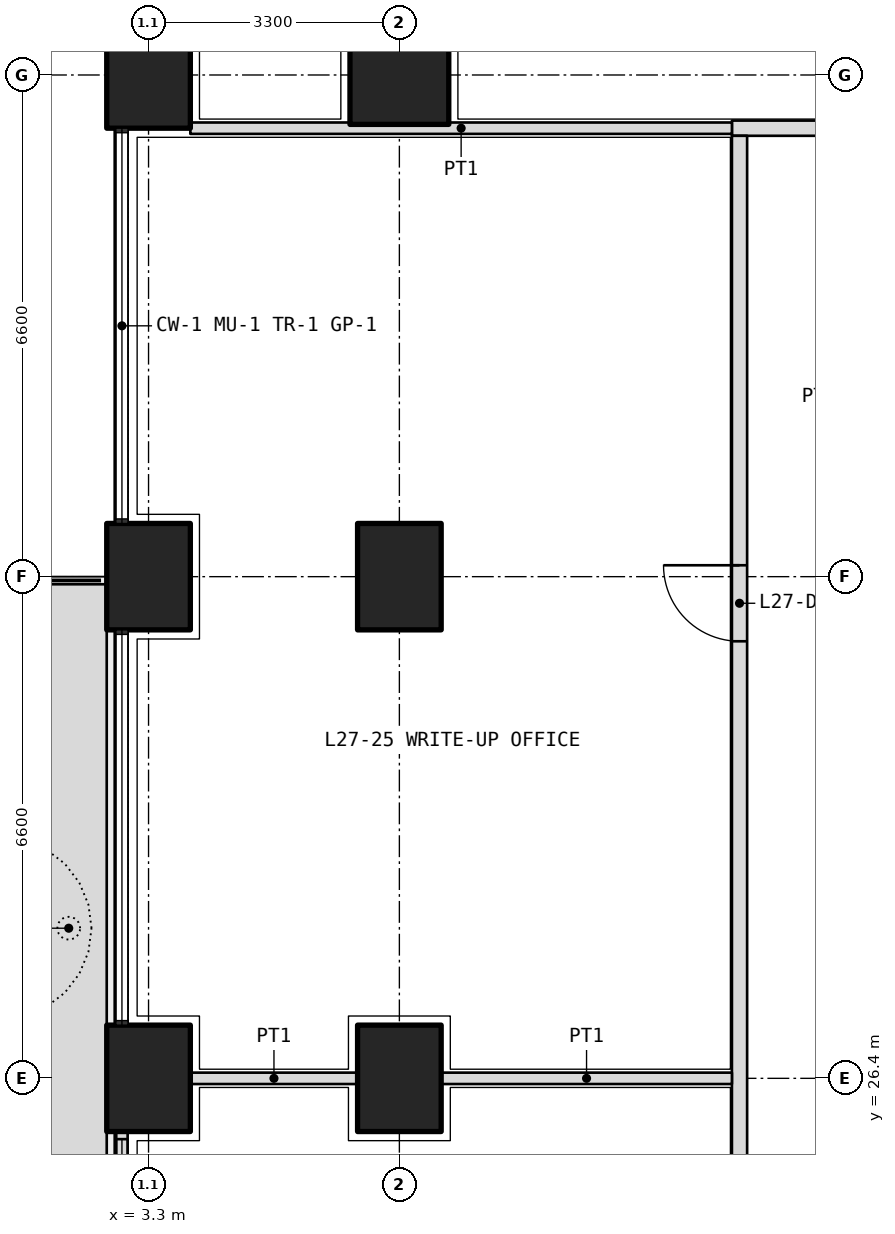
"""IFC4 building model, lengths in metres.
Left out: names, types, materials, properties, quantities, classifications, styles, units other than length and angle.
Written with IfcOpenShell. Run it as: python <this file> out.ifc"""

import sys

from ifc_helpers import new_model, si_unit, direction, frame, frame_2d, origin, origin_2d, place, context, subcontext, project, spatial, polyline, rectangle, outline, extrude, element, fill, save


model = new_model("IFC4")
c1 = context("Model", 3, precision=1e-05, world=origin(), true_north=direction((0.0, 1.0)))
c2 = subcontext(c1, "Body", "Model", "MODEL_VIEW")
j1 = project(units=[si_unit("LENGTHUNIT", "METRE"), si_unit("PLANEANGLEUNIT", "RADIAN")], contexts=[c1])
p1 = place(None, origin())
s1 = spatial("IfcSite", under=j1, at=p1, CompositionType="ELEMENT")
p2 = place(p1, origin())
s2 = spatial("IfcBuilding", under=s1, at=p2, CompositionType="ELEMENT")
p3 = place(p2, frame((0.0, 0.0, 120.0)))
s3 = spatial("IfcBuildingStorey", under=s2, at=p3, CompositionType="ELEMENT", Elevation=120.0)
for number, where, z_axis, x_axis in (
    (1, (3.3, 26.4, 0.0), (0.0, 0.0, 1.0), (0.0, 1.0, 0.0)),
    (2, (3.3, 33.0, 0.0), (0.0, 0.0, 1.0), (0.0, 1.0, 0.0)),
    (3, (3.3, 39.6, 0.0), (0.0, 0.0, 1.0), (0.0, 1.0, 0.0)),
):
    element("IfcColumn", number, at=place(p3, frame(where, z_axis=z_axis, x_axis=x_axis)), inside=s3, PredefinedType="COLUMN", context=c2, shape_type="SweptSolid", body=[
        extrude(rectangle(XDim=1.4, YDim=1.1, at=origin_2d()), origin(), (0.0, 0.0, 1.0), 4.2),
    ])
p4 = place(p3, frame((6.6, 39.6, 0.0), z_axis=(0.0, 0.0, 1.0), x_axis=(1.0, 0.0, 0.0)))
e4 = element("IfcColumn", 4, at=p4, inside=s3, PredefinedType="COLUMN", context=c2, shape_type="SweptSolid", body=[
    extrude(rectangle(XDim=1.3, YDim=1.3, at=origin_2d()), origin(), (0.0, 0.0, 1.0), 4.2),
])
for number, where, z_axis, x_axis in (
    (5, (6.6, 26.4, 0.0), (0.0, 0.0, 1.0), (0.0, 1.0, 0.0)),
    (6, (6.6, 33.0, 0.0), (0.0, 0.0, 1.0), (0.0, 1.0, 0.0)),
):
    element("IfcColumn", number, at=place(p3, frame(where, z_axis=z_axis, x_axis=x_axis)), inside=s3, PredefinedType="COLUMN", context=c2, shape_type="SweptSolid", body=[
        extrude(rectangle(XDim=1.4, YDim=1.1, at=origin_2d()), origin(), (0.0, 0.0, 1.0), 4.2),
    ])
p5 = place(p3, origin())
e7 = element("IfcWall", 7, at=p5, inside=s3, PredefinedType="USERDEFINED", context=c2, shape_type="SweptSolid", body=[
    extrude(outline(polyline([(1.75, 23.85), (2.75, 23.85), (2.75, 32.9), (1.75, 32.9), (1.75, 23.85)]), holes=[polyline([(1.9, 24.0), (2.6, 24.0), (2.6, 32.75), (1.9, 32.75), (1.9, 24.0)])]), origin(), (0.0, 0.0, 1.0), 1.05),
])
p6 = place(p3, frame((2.95, 25.7, 0.0), z_axis=(0.0, 0.0, 1.0), x_axis=(0.0, -1.0, 0.0)))
e8 = element("IfcWall", 8, at=p6, inside=s3, PredefinedType="SOLIDWALL", context=c2, shape_type="SweptSolid", body=[
    extrude(rectangle(XDim=5.2, YDim=0.15, at=frame_2d((2.6, 0.0))), origin(), (0.0, 0.0, 1.0), 2.7),
])
p7 = place(p6, frame((1.35, 0.0, 0.0)))
e9 = element("IfcOpeningElement", 9, at=p7, cuts=e8, PredefinedType="OPENING", context=c2, shape_type="SweptSolid", body=[
    extrude(rectangle(XDim=1.0, YDim=2.4, at=frame_2d((0.5, 1.2))), frame((0.0, 0.085, 0.0), z_axis=(0.0, -1.0, 0.0), x_axis=(1.0, 0.0, 0.0)), (0.0, 0.0, 1.0), 0.17),
])
p8 = place(p6, frame((0.1, 0.0, 0.1)))
e10 = element("IfcOpeningElement", 10, at=p8, cuts=e8, PredefinedType="OPENING", context=c2, shape_type="SweptSolid", body=[
    extrude(rectangle(XDim=1.15, YDim=2.3, at=frame_2d((0.575, 1.15))), frame((0.0, 0.085, 0.0), z_axis=(0.0, -1.0, 0.0), x_axis=(1.0, 0.0, 0.0)), (0.0, 0.0, 1.0), 0.17),
])
p9 = place(p6, frame((2.85, 0.0, 0.1)))
e11 = element("IfcOpeningElement", 11, at=p9, cuts=e8, PredefinedType="OPENING", context=c2, shape_type="SweptSolid", body=[
    extrude(rectangle(XDim=2.25, YDim=2.3, at=frame_2d((1.125, 1.15))), frame((0.0, 0.085, 0.0), z_axis=(0.0, -1.0, 0.0), x_axis=(1.0, 0.0, 0.0)), (0.0, 0.0, 1.0), 0.17),
])
p10 = place(p3, frame((10.975, 38.9, 0.0), z_axis=(0.0, 0.0, 1.0), x_axis=(1.0, 0.0, 0.0)))
e12 = element("IfcWall", 12, at=p10, inside=s3, PredefinedType="PARTITIONING", context=c2, shape_type="SweptSolid", body=[
    extrude(rectangle(XDim=30.85, YDim=0.2, at=frame_2d((15.425, 0.0))), origin(), (0.0, 0.0, 1.0), 2.85),
])
p11 = place(p10, frame((12.113, 0.0, 0.0)))
e13 = element("IfcOpeningElement", 13, at=p11, cuts=e12, PredefinedType="OPENING", context=c2, shape_type="SweptSolid", body=[
    extrude(rectangle(XDim=1.2, YDim=2.1, at=frame_2d((0.6, 1.05))), frame((0.0, 0.11, 0.0), z_axis=(0.0, -1.0, 0.0), x_axis=(1.0, 0.0, 0.0)), (0.0, 0.0, 1.0), 0.22),
])
p12 = place(p10, frame((26.475, 0.0, 0.0)))
e14 = element("IfcOpeningElement", 14, at=p12, cuts=e12, PredefinedType="OPENING", context=c2, shape_type="SweptSolid", body=[
    extrude(rectangle(XDim=1.0, YDim=2.1, at=frame_2d((0.5, 1.05))), frame((0.0, 0.11, 0.0), z_axis=(0.0, -1.0, 0.0), x_axis=(1.0, 0.0, 0.0)), (0.0, 0.0, 1.0), 0.22),
])
p13 = place(p10, frame((29.188, 0.0, 0.0)))
e15 = element("IfcOpeningElement", 15, at=p13, cuts=e12, PredefinedType="OPENING", context=c2, shape_type="SweptSolid", body=[
    extrude(rectangle(XDim=1.0, YDim=2.1, at=frame_2d((0.5, 1.05))), frame((0.0, 0.11, 0.0), z_axis=(0.0, -1.0, 0.0), x_axis=(1.0, 0.0, 0.0)), (0.0, 0.0, 1.0), 0.22),
])
p14 = place(p3, frame((11.075, 11.175, 0.0), z_axis=(0.0, 0.0, 1.0), x_axis=(0.0, 1.0, 0.0)))
e16 = element("IfcWall", 16, at=p14, inside=s3, PredefinedType="PARTITIONING", context=c2, shape_type="SweptSolid", body=[
    extrude(rectangle(XDim=27.625, YDim=0.2, at=frame_2d((13.812, 0.0))), origin(), (0.0, 0.0, 1.0), 2.85),
])
p15 = place(p14, frame((0.462, 0.0, 0.0)))
e17 = element("IfcOpeningElement", 17, at=p15, cuts=e16, PredefinedType="OPENING", context=c2, shape_type="SweptSolid", body=[
    extrude(rectangle(XDim=1.0, YDim=2.1, at=frame_2d((0.5, 1.05))), frame((0.0, 0.11, 0.0), z_axis=(0.0, -1.0, 0.0), x_axis=(1.0, 0.0, 0.0)), (0.0, 0.0, 1.0), 0.22),
])
p16 = place(p14, frame((2.575, 0.0, 0.0)))
e18 = element("IfcOpeningElement", 18, at=p16, cuts=e16, PredefinedType="OPENING", context=c2, shape_type="SweptSolid", body=[
    extrude(rectangle(XDim=1.0, YDim=2.1, at=frame_2d((0.5, 1.05))), frame((0.0, 0.11, 0.0), z_axis=(0.0, -1.0, 0.0), x_axis=(1.0, 0.0, 0.0)), (0.0, 0.0, 1.0), 0.22),
])
p17 = place(p14, frame((5.65, 0.0, 0.0)))
e19 = element("IfcOpeningElement", 19, at=p17, cuts=e16, PredefinedType="OPENING", context=c2, shape_type="SweptSolid", body=[
    extrude(rectangle(XDim=0.9, YDim=2.1, at=frame_2d((0.45, 1.05))), frame((0.0, 0.11, 0.0), z_axis=(0.0, -1.0, 0.0), x_axis=(1.0, 0.0, 0.0)), (0.0, 0.0, 1.0), 0.22),
])
p18 = place(p14, frame((9.5, 0.0, 0.0)))
e20 = element("IfcOpeningElement", 20, at=p18, cuts=e16, PredefinedType="OPENING", context=c2, shape_type="SweptSolid", body=[
    extrude(rectangle(XDim=0.9, YDim=2.1, at=frame_2d((0.45, 1.05))), frame((0.0, 0.11, 0.0), z_axis=(0.0, -1.0, 0.0), x_axis=(1.0, 0.0, 0.0)), (0.0, 0.0, 1.0), 0.22),
])
p19 = place(p14, frame((13.025, 0.0, 0.0)))
e21 = element("IfcOpeningElement", 21, at=p19, cuts=e16, PredefinedType="OPENING", context=c2, shape_type="SweptSolid", body=[
    extrude(rectangle(XDim=1.0, YDim=2.1, at=frame_2d((0.5, 1.05))), frame((0.0, 0.11, 0.0), z_axis=(0.0, -1.0, 0.0), x_axis=(1.0, 0.0, 0.0)), (0.0, 0.0, 1.0), 0.22),
])
p20 = place(p14, frame((20.975, 0.0, 0.0)))
e22 = element("IfcOpeningElement", 22, at=p20, cuts=e16, PredefinedType="OPENING", context=c2, shape_type="SweptSolid", body=[
    extrude(rectangle(XDim=1.0, YDim=2.1, at=frame_2d((0.5, 1.05))), frame((0.0, 0.11, 0.0), z_axis=(0.0, -1.0, 0.0), x_axis=(1.0, 0.0, 0.0)), (0.0, 0.0, 1.0), 0.22),
])
p21 = place(p3, frame((3.85, 38.9, 0.0), z_axis=(0.0, 0.0, 1.0), x_axis=(1.0, 0.0, 0.0)))
e23 = element("IfcWall", 23, at=p21, inside=s3, PredefinedType="PARTITIONING", context=c2, shape_type="SweptSolid", body=[
    extrude(rectangle(XDim=7.125, YDim=0.15, at=frame_2d((3.562, 0.0))), origin(), (0.0, 0.0, 1.0), 2.85),
])
p22 = place(p3, frame((3.85, 26.4, 0.0), z_axis=(0.0, 0.0, 1.0), x_axis=(1.0, 0.0, 0.0)))
e24 = element("IfcWall", 24, at=p22, inside=s3, PredefinedType="PARTITIONING", context=c2, shape_type="SweptSolid", body=[
    extrude(rectangle(XDim=2.2, YDim=0.15, at=frame_2d((1.1, 0.0))), origin(), (0.0, 0.0, 1.0), 2.85),
])
p23 = place(p3, frame((7.15, 26.4, 0.0), z_axis=(0.0, 0.0, 1.0), x_axis=(1.0, 0.0, 0.0)))
e25 = element("IfcWall", 25, at=p23, inside=s3, PredefinedType="PARTITIONING", context=c2, shape_type="SweptSolid", body=[
    extrude(rectangle(XDim=3.825, YDim=0.15, at=frame_2d((1.913, 0.0))), origin(), (0.0, 0.0, 1.0), 2.85),
])
p24 = place(p8, origin())
e26 = element("IfcWindow", 26, at=p24, inside=s3, PartitioningType="SINGLE_PANEL", PredefinedType="WINDOW", context=c2, shape_type="SweptSolid", body=[
    extrude(rectangle(XDim=1.15, YDim=2.3, at=frame_2d((0.575, 1.15))), frame((0.0, 0.03, 0.0), z_axis=(0.0, -1.0, 0.0), x_axis=(1.0, 0.0, 0.0)), (0.0, 0.0, 1.0), 0.06),
])
fill(e10, e26)
p25 = place(p20, origin())
e27 = element("IfcDoor", 27, at=p25, inside=s3, OperationType="SINGLE_SWING_RIGHT", PredefinedType="DOOR", context=c2, shape_type="SweptSolid", body=[
    extrude(rectangle(XDim=1.0, YDim=2.1, at=frame_2d((0.5, 1.05))), frame((0.0, 0.025, 0.0), z_axis=(0.0, -1.0, 0.0), x_axis=(1.0, 0.0, 0.0)), (0.0, 0.0, 1.0), 0.05),
])
fill(e22, e27)
save(model, sys.argv[1])
